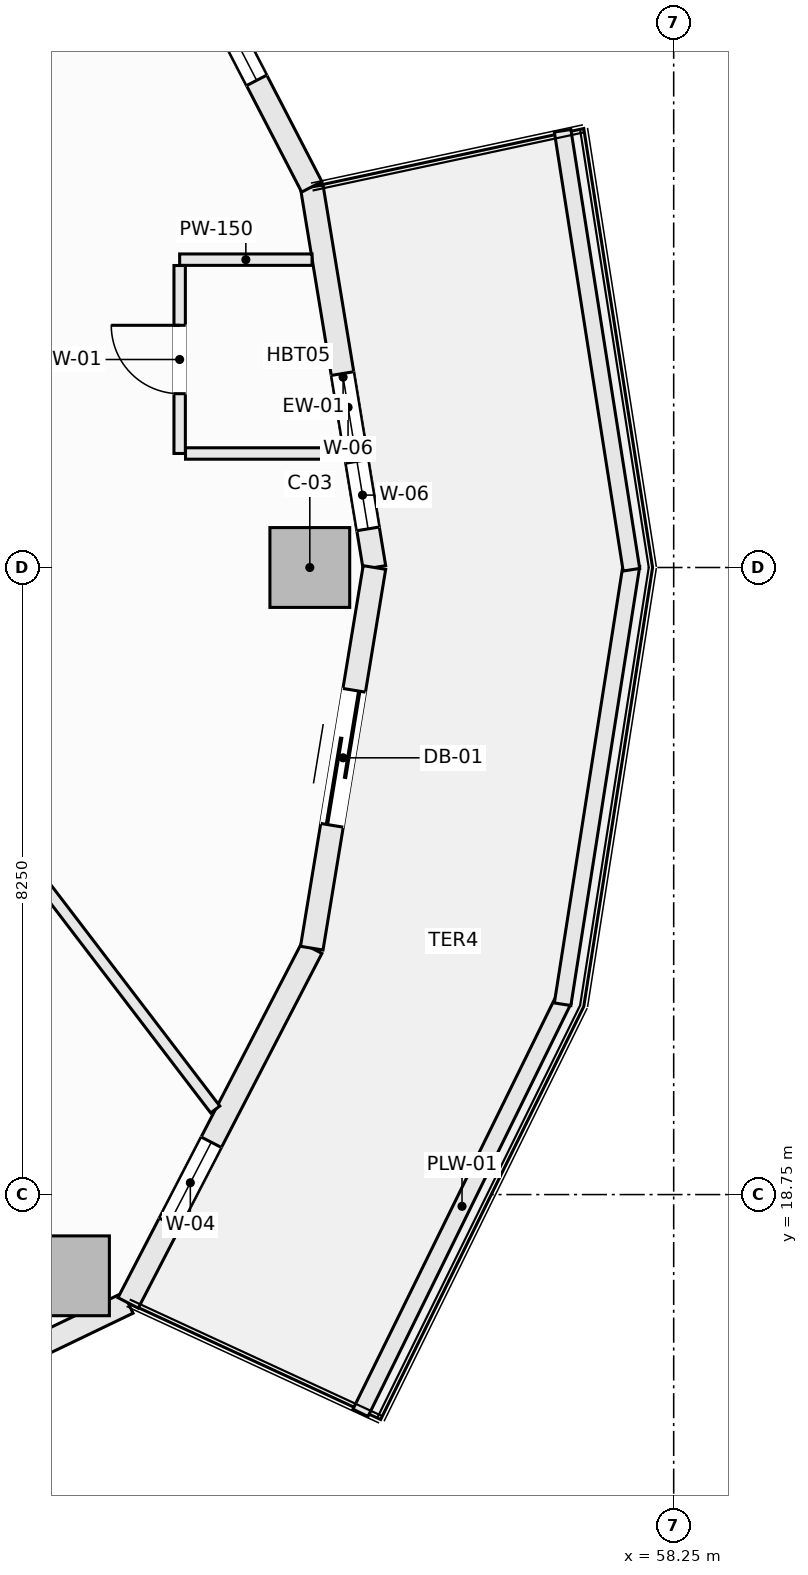
"""IFC4 building model, lengths in metres.
Left out: names, types, materials, properties, quantities, classifications, styles, units other than length and angle.
Written with IfcOpenShell. Run it as: python <this file> out.ifc"""

import sys

from ifc_helpers import new_model, si_unit, direction, frame, frame_2d, origin, origin_2d, place, context, subcontext, project, spatial, rectangle, extrude, element, fill, save


model = new_model("IFC4")
c1 = context("Model", 3, precision=1e-05, world=origin(), true_north=direction((0.0, 1.0)))
c2 = subcontext(c1, "Body", "Model", "MODEL_VIEW")
j1 = project(units=[si_unit("LENGTHUNIT", "METRE"), si_unit("PLANEANGLEUNIT", "RADIAN")], contexts=[c1])
p1 = place(None, origin())
s1 = spatial("IfcSite", under=j1, at=p1, CompositionType="ELEMENT")
p2 = place(p1, origin())
s2 = spatial("IfcBuilding", under=s1, at=p2, CompositionType="ELEMENT")
p3 = place(p2, frame((0.0, 0.0, 118.9)))
s3 = spatial("IfcBuildingStorey", under=s2, at=p3, CompositionType="ELEMENT", Elevation=118.9)
for number, where, z_axis, x_axis in (
    (1, (53.462, 27.0, -0.27), (0.0, 0.0, 1.0), (1.0, 0.0, 0.0)),
    (2, (50.3, 17.681, -0.27), (0.0, 0.0, 1.0), (1.0, 0.0, 0.0)),
):
    element("IfcColumn", number, at=place(p3, frame(where, z_axis=z_axis, x_axis=x_axis)), inside=s3, PredefinedType="COLUMN", context=c2, shape_type="SweptSolid", body=[
        extrude(rectangle(XDim=1.05, YDim=1.05, at=origin_2d()), origin(), (0.0, 0.0, 1.0), 3.4),
    ])
p4 = place(p3, frame((53.488, 32.008, 0.0), z_axis=(0.0, 0.0, 1.0), x_axis=(0.162393944769, -0.986726003864, 0.0)))
e3 = element("IfcWall", 3, at=p4, inside=s3, PredefinedType="SOLIDWALL", context=c2, shape_type="SweptSolid", body=[
    extrude(rectangle(XDim=5.075, YDim=0.3, at=frame_2d((2.538, 0.0))), origin(), (0.0, 0.0, 1.0), 2.653),
])
p5 = place(p4, frame((2.49, 0.0, 0.72)))
e4 = element("IfcOpeningElement", 4, at=p5, cuts=e3, PredefinedType="OPENING", context=c2, shape_type="SweptSolid", body=[
    extrude(rectangle(XDim=0.9, YDim=1.65, at=frame_2d((0.45, 0.825))), frame((0.0, 0.16, 0.0), z_axis=(0.0, -1.0, 0.0), x_axis=(1.0, 0.0, 0.0)), (0.0, 0.0, 1.0), 0.32),
])
p6 = place(p4, frame((3.66, 0.0, 0.72)))
e5 = element("IfcOpeningElement", 5, at=p6, cuts=e3, PredefinedType="OPENING", context=c2, shape_type="SweptSolid", body=[
    extrude(rectangle(XDim=0.9, YDim=1.65, at=frame_2d((0.45, 0.825))), frame((0.0, 0.16, 0.0), z_axis=(0.0, -1.0, 0.0), x_axis=(1.0, 0.0, 0.0)), (0.0, 0.0, 1.0), 0.32),
])
p7 = place(p3, frame((51.072, 36.675, 0.0), z_axis=(0.0, 0.0, 1.0), x_axis=(0.459767899643, -0.888039119892, 0.0)))
e6 = element("IfcWall", 6, at=p7, inside=s3, PredefinedType="SOLIDWALL", context=c2, shape_type="SweptSolid", body=[
    extrude(rectangle(XDim=5.255, YDim=0.3, at=frame_2d((2.628, 0.0))), origin(), (0.0, 0.0, 1.0), 2.653),
])
p8 = place(p7, frame((1.578, 0.0, 0.74)))
e7 = element("IfcOpeningElement", 7, at=p8, cuts=e6, PredefinedType="OPENING", context=c2, shape_type="SweptSolid", body=[
    extrude(rectangle(XDim=2.1, YDim=1.7, at=frame_2d((1.05, 0.85))), frame((0.0, 0.16, 0.0), z_axis=(0.0, -1.0, 0.0), x_axis=(1.0, 0.0, 0.0)), (0.0, 0.0, 1.0), 0.32),
])
p9 = place(p3, frame((45.769, 14.777, 0.0), z_axis=(0.0, 0.0, 1.0), x_axis=(0.901370184739, 0.433049408339, 0.0)))
e8 = element("IfcWall", 8, at=p9, inside=s3, PredefinedType="SOLIDWALL", context=c2, shape_type="SweptSolid", body=[
    extrude(rectangle(XDim=5.884, YDim=0.3, at=frame_2d((2.942, 0.0))), origin(), (0.0, 0.0, 1.0), 2.653),
])
p10 = place(p9, frame((1.892, 0.0, 0.74)))
e9 = element("IfcOpeningElement", 9, at=p10, cuts=e8, PredefinedType="OPENING", context=c2, shape_type="SweptSolid", body=[
    extrude(rectangle(XDim=2.1, YDim=1.7, at=frame_2d((1.05, 0.85))), frame((0.0, 0.16, 0.0), z_axis=(0.0, -1.0, 0.0), x_axis=(1.0, 0.0, 0.0)), (0.0, 0.0, 1.0), 0.32),
])
p11 = place(p3, frame((51.072, 17.325, 0.0), z_axis=(0.0, 0.0, 1.0), x_axis=(0.459767899643, 0.888039119892, 0.0)))
e10 = element("IfcWall", 10, at=p11, inside=s3, PredefinedType="SOLIDWALL", context=c2, shape_type="SweptSolid", body=[
    extrude(rectangle(XDim=5.255, YDim=0.3, at=frame_2d((2.628, 0.0))), origin(), (0.0, 0.0, 1.0), 2.653),
])
p12 = place(p11, frame((1.18, 0.0, 0.72)))
e11 = element("IfcOpeningElement", 11, at=p12, cuts=e10, PredefinedType="OPENING", context=c2, shape_type="SweptSolid", body=[
    extrude(rectangle(XDim=1.2, YDim=1.65, at=frame_2d((0.6, 0.825))), frame((0.0, 0.16, 0.0), z_axis=(0.0, -1.0, 0.0), x_axis=(1.0, 0.0, 0.0)), (0.0, 0.0, 1.0), 0.32),
])
p13 = place(p3, frame((53.488, 21.992, 0.0), z_axis=(0.0, 0.0, 1.0), x_axis=(0.162393944769, 0.986726003864, 0.0)))
e12 = element("IfcWall", 12, at=p13, inside=s3, PredefinedType="SOLIDWALL", context=c2, shape_type="SweptSolid", body=[
    extrude(rectangle(XDim=5.075, YDim=0.3, at=frame_2d((2.538, 0.0))), origin(), (0.0, 0.0, 1.0), 2.653),
])
p14 = place(p13, frame((1.638, 0.0, 0.0)))
e13 = element("IfcOpeningElement", 13, at=p14, cuts=e12, PredefinedType="OPENING", context=c2, shape_type="SweptSolid", body=[
    extrude(rectangle(XDim=1.8, YDim=2.25, at=frame_2d((0.9, 1.125))), frame((0.0, 0.16, 0.0), z_axis=(0.0, -1.0, 0.0), x_axis=(1.0, 0.0, 0.0)), (0.0, 0.0, 1.0), 0.32),
])
p15 = place(p3, frame((54.129, 15.878, 0.0), z_axis=(0.0, 0.0, 1.0), x_axis=(0.441269631716, 0.897374566235, 0.0)))
e14 = element("IfcWall", 14, at=p15, inside=s3, PredefinedType="PARAPET", context=c2, shape_type="SweptSolid", body=[
    extrude(rectangle(XDim=6.056, YDim=0.22, at=frame_2d((3.028, 0.0))), origin(), (0.0, 0.0, 1.0), 0.52),
])
for number, where, z_axis, x_axis in (
    (15, (56.789, 21.254, 0.0), (0.0, 0.0, 1.0), (0.155, 0.988, 0.0)),
    (16, (56.789, 32.746, 0.0), (0.0, 0.0, 1.0), (0.155, -0.988, 0.0)),
):
    element("IfcWall", number, at=place(p3, frame(where, z_axis=z_axis, x_axis=x_axis)), inside=s3, PredefinedType="PARAPET", context=c2, shape_type="SweptSolid", body=[
        extrude(rectangle(XDim=5.846, YDim=0.22, at=frame_2d((2.923, 0.0))), origin(), (0.0, 0.0, 1.0), 0.52),
    ])
p16 = place(p3, frame((43.862, 30.809, 0.0), z_axis=(0.0, 0.0, 1.0), x_axis=(0.607045175038, -0.794667323767, 0.0)))
e17 = element("IfcWall", 17, at=p16, inside=s3, PredefinedType="PARTITIONING", context=c2, shape_type="SweptSolid", body=[
    extrude(rectangle(XDim=13.766, YDim=0.15, at=frame_2d((6.883, 0.0))), origin(), (0.0, 0.0, 1.0), 3.13),
])
p17 = place(p3, frame((51.75, 31.05, 0.0), z_axis=(0.0, 0.0, 1.0), x_axis=(1.0, 0.0, 0.0)))
e18 = element("IfcWall", 18, at=p17, inside=s3, PredefinedType="PARTITIONING", context=c2, shape_type="SweptSolid", body=[
    extrude(rectangle(XDim=1.742, YDim=0.15, at=frame_2d((0.871, 0.0))), origin(), (0.0, 0.0, 1.0), 3.13),
])
p18 = place(p3, frame((51.75, 28.5, 0.0), z_axis=(0.0, 0.0, 1.0), x_axis=(0.0, 1.0, 0.0)))
e19 = element("IfcWall", 19, at=p18, inside=s3, PredefinedType="PARTITIONING", context=c2, shape_type="SweptSolid", body=[
    extrude(rectangle(XDim=2.473, YDim=0.15, at=frame_2d((1.236, 0.0))), origin(), (0.0, 0.0, 1.0), 3.13),
])
p19 = place(p18, frame((0.787, 0.0, 0.0)))
e20 = element("IfcOpeningElement", 20, at=p19, cuts=e19, PredefinedType="OPENING", context=c2, shape_type="SweptSolid", body=[
    extrude(rectangle(XDim=0.9, YDim=2.1, at=frame_2d((0.45, 1.05))), frame((0.0, 0.085, 0.0), z_axis=(0.0, -1.0, 0.0), x_axis=(1.0, 0.0, 0.0)), (0.0, 0.0, 1.0), 0.17),
])
p20 = place(p3, frame((51.827, 28.5, 0.0), z_axis=(0.0, 0.0, 1.0), x_axis=(1.0, 0.0, 0.0)))
e21 = element("IfcWall", 21, at=p20, inside=s3, PredefinedType="PARTITIONING", context=c2, shape_type="SweptSolid", body=[
    extrude(rectangle(XDim=2.085, YDim=0.15, at=frame_2d((1.042, 0.0))), origin(), (0.0, 0.0, 1.0), 3.13),
])
p21 = place(p5, origin())
e22 = element("IfcWindow", 22, at=p21, inside=s3, PartitioningType="SINGLE_PANEL", PredefinedType="WINDOW", context=c2, shape_type="SweptSolid", body=[
    extrude(rectangle(XDim=0.9, YDim=1.65, at=frame_2d((0.45, 0.825))), frame((0.0, 0.03, 0.0), z_axis=(0.0, -1.0, 0.0), x_axis=(1.0, 0.0, 0.0)), (0.0, 0.0, 1.0), 0.06),
])
fill(e4, e22)
p22 = place(p8, origin())
e23 = element("IfcWindow", 23, at=p22, inside=s3, PartitioningType="SINGLE_PANEL", PredefinedType="WINDOW", context=c2, shape_type="SweptSolid", body=[
    extrude(rectangle(XDim=2.1, YDim=1.7, at=frame_2d((1.05, 0.85))), frame((0.0, 0.03, 0.0), z_axis=(0.0, -1.0, 0.0), x_axis=(1.0, 0.0, 0.0)), (0.0, 0.0, 1.0), 0.06),
])
fill(e7, e23)
p23 = place(p12, origin())
e24 = element("IfcWindow", 24, at=p23, inside=s3, PartitioningType="SINGLE_PANEL", PredefinedType="WINDOW", context=c2, shape_type="SweptSolid", body=[
    extrude(rectangle(XDim=1.2, YDim=1.65, at=frame_2d((0.6, 0.825))), frame((0.0, 0.03, 0.0), z_axis=(0.0, -1.0, 0.0), x_axis=(1.0, 0.0, 0.0)), (0.0, 0.0, 1.0), 0.06),
])
fill(e11, e24)
p24 = place(p14, frame((1.8, 0.0, 0.0), z_axis=(0.0, 0.0, 1.0), x_axis=(-1.0, 0.0, 0.0)))
e25 = element("IfcDoor", 25, at=p24, inside=s3, OperationType="SLIDING_TO_LEFT", PredefinedType="DOOR", context=c2, shape_type="SweptSolid", body=[
    extrude(rectangle(XDim=1.8, YDim=2.25, at=frame_2d((0.9, 1.125))), frame((0.0, 0.025, 0.0), z_axis=(0.0, -1.0, 0.0), x_axis=(1.0, 0.0, 0.0)), (0.0, 0.0, 1.0), 0.05),
])
fill(e13, e25)
p25 = place(p19, origin())
e26 = element("IfcDoor", 26, at=p25, inside=s3, OperationType="SINGLE_SWING_RIGHT", PredefinedType="DOOR", context=c2, shape_type="SweptSolid", body=[
    extrude(rectangle(XDim=0.9, YDim=2.1, at=frame_2d((0.45, 1.05))), frame((0.0, 0.025, 0.0), z_axis=(0.0, -1.0, 0.0), x_axis=(1.0, 0.0, 0.0)), (0.0, 0.0, 1.0), 0.05),
])
fill(e20, e26)
p26 = place(p6, origin())
e27 = element("IfcWindow", 27, at=p26, inside=s3, PartitioningType="SINGLE_PANEL", PredefinedType="WINDOW", context=c2, shape_type="SweptSolid", body=[
    extrude(rectangle(XDim=0.9, YDim=1.65, at=frame_2d((0.45, 0.825))), frame((0.0, 0.03, 0.0), z_axis=(0.0, -1.0, 0.0), x_axis=(1.0, 0.0, 0.0)), (0.0, 0.0, 1.0), 0.06),
])
fill(e5, e27)
save(model, sys.argv[1])
